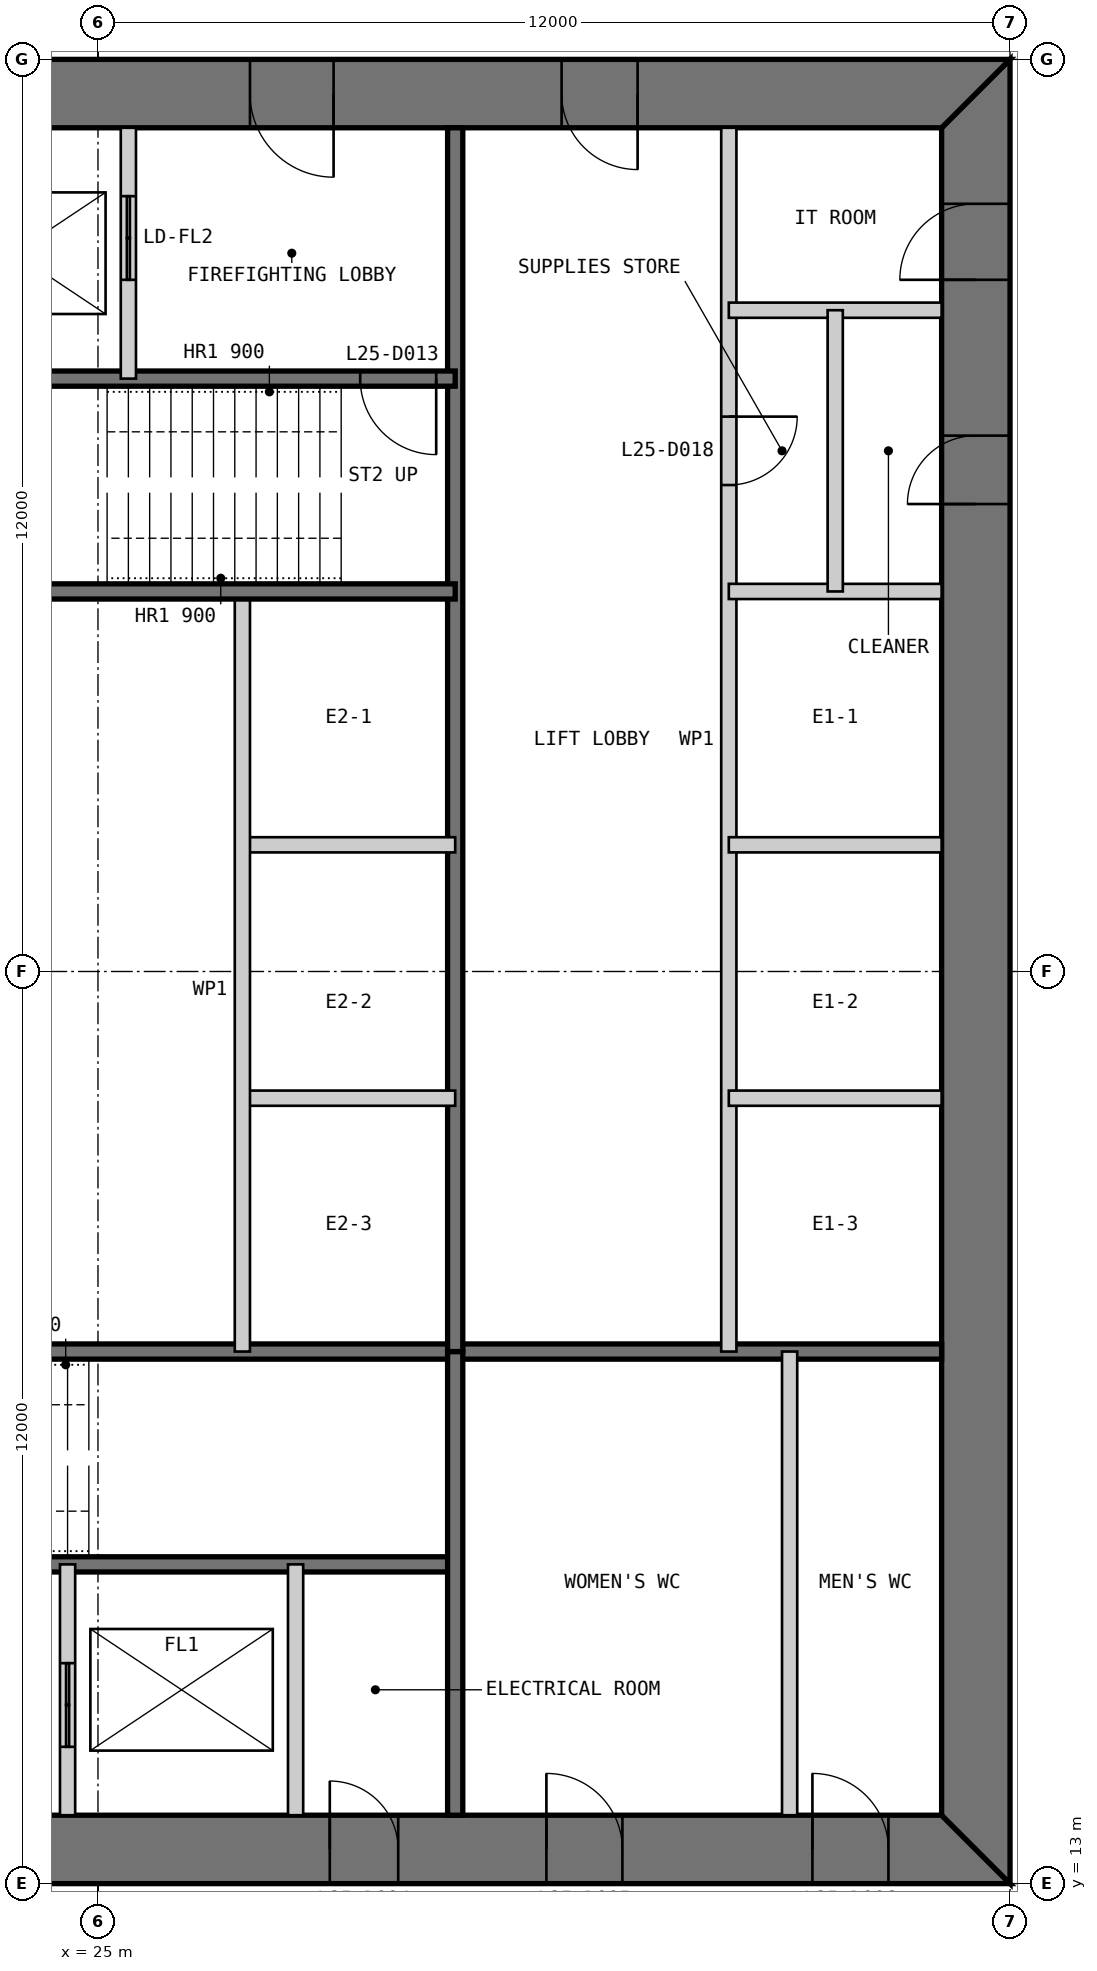
"""IFC4 building model, lengths in metres.
Left out: names, types, materials, properties, quantities, classifications, styles, units other than length and angle.
Written with IfcOpenShell. Run it as: python <this file> out.ifc"""

import sys

from ifc_helpers import new_model, si_unit, direction, frame, frame_2d, origin, place, context, subcontext, project, spatial, polyline, rectangle, outline, extrude, element, fill, save


model = new_model("IFC4")
c1 = context("Model", 3, precision=1e-05, world=origin(), true_north=direction((0.0, 1.0)))
c2 = subcontext(c1, "Body", "Model", "MODEL_VIEW")
j1 = project(units=[si_unit("LENGTHUNIT", "METRE"), si_unit("PLANEANGLEUNIT", "RADIAN")], contexts=[c1])
p1 = place(None, origin())
s1 = spatial("IfcSite", under=j1, at=p1, CompositionType="ELEMENT")
p2 = place(p1, origin())
s2 = spatial("IfcBuilding", under=s1, at=p2, CompositionType="ELEMENT")
p3 = place(p2, frame((0.0, 0.0, 110.4)))
s3 = spatial("IfcBuildingStorey", under=s2, at=p3, CompositionType="ELEMENT", Elevation=110.4)
p4 = place(p3, frame((13.0, 13.45, 0.0), z_axis=(0.0, 0.0, 1.0), x_axis=(1.0, 0.0, 0.0)))
e1 = element("IfcWall", 1, at=p4, inside=s3, PredefinedType="SHEAR", context=c2, shape_type="SweptSolid", body=[
    extrude(outline(polyline([(0.0, -0.45), (24.0, -0.45), (23.1, 0.45), (0.9, 0.45), (0.0, -0.45)])), origin(), (0.0, 0.0, 1.0), 4.0),
])
p5 = place(p4, frame((4.9, 0.0, 0.0)))
e2 = element("IfcOpeningElement", 2, at=p5, cuts=e1, PredefinedType="OPENING", context=c2, shape_type="SweptSolid", body=[
    extrude(rectangle(XDim=1.0, YDim=2.2, at=frame_2d((0.5, 1.1))), frame((0.0, 0.46, 0.0), z_axis=(0.0, -1.0, 0.0), x_axis=(1.0, 0.0, 0.0)), (0.0, 0.0, 1.0), 0.92),
])
p6 = place(p4, frame((8.9, 0.0, 0.0)))
e3 = element("IfcOpeningElement", 3, at=p6, cuts=e1, PredefinedType="OPENING", context=c2, shape_type="SweptSolid", body=[
    extrude(rectangle(XDim=1.1, YDim=2.2, at=frame_2d((0.55, 1.1))), frame((0.0, 0.46, 0.0), z_axis=(0.0, -1.0, 0.0), x_axis=(1.0, 0.0, 0.0)), (0.0, 0.0, 1.0), 0.92),
])
p7 = place(p4, frame((15.05, 0.0, 0.0)))
e4 = element("IfcOpeningElement", 4, at=p7, cuts=e1, PredefinedType="OPENING", context=c2, shape_type="SweptSolid", body=[
    extrude(rectangle(XDim=0.9, YDim=2.2, at=frame_2d((0.45, 1.1))), frame((0.0, 0.46, 0.0), z_axis=(0.0, -1.0, 0.0), x_axis=(1.0, 0.0, 0.0)), (0.0, 0.0, 1.0), 0.92),
])
p8 = place(p4, frame((17.9, 0.0, 0.0)))
e5 = element("IfcOpeningElement", 5, at=p8, cuts=e1, PredefinedType="OPENING", context=c2, shape_type="SweptSolid", body=[
    extrude(rectangle(XDim=1.0, YDim=2.2, at=frame_2d((0.5, 1.1))), frame((0.0, 0.46, 0.0), z_axis=(0.0, -1.0, 0.0), x_axis=(1.0, 0.0, 0.0)), (0.0, 0.0, 1.0), 0.92),
])
p9 = place(p4, frame((21.4, 0.0, 0.0)))
e6 = element("IfcOpeningElement", 6, at=p9, cuts=e1, PredefinedType="OPENING", context=c2, shape_type="SweptSolid", body=[
    extrude(rectangle(XDim=1.0, YDim=2.2, at=frame_2d((0.5, 1.1))), frame((0.0, 0.46, 0.0), z_axis=(0.0, -1.0, 0.0), x_axis=(1.0, 0.0, 0.0)), (0.0, 0.0, 1.0), 0.92),
])
p10 = place(p3, frame((36.55, 13.9, 0.0), z_axis=(0.0, 0.0, 1.0), x_axis=(0.0, 1.0, 0.0)))
e7 = element("IfcWall", 7, at=p10, inside=s3, PredefinedType="SHEAR", context=c2, shape_type="SweptSolid", body=[
    extrude(outline(polyline([(-0.9, -0.45), (23.1, -0.45), (22.2, 0.45), (0.0, 0.45), (-0.9, -0.45)])), origin(), (0.0, 0.0, 1.0), 4.0),
])
p11 = place(p10, frame((20.2, 0.0, 0.0)))
e8 = element("IfcOpeningElement", 8, at=p11, cuts=e7, PredefinedType="OPENING", context=c2, shape_type="SweptSolid", body=[
    extrude(rectangle(XDim=1.0, YDim=2.2, at=frame_2d((0.5, 1.1))), frame((0.0, 0.46, 0.0), z_axis=(0.0, -1.0, 0.0), x_axis=(1.0, 0.0, 0.0)), (0.0, 0.0, 1.0), 0.92),
])
p12 = place(p10, frame((17.25, 0.0, 0.0)))
e9 = element("IfcOpeningElement", 9, at=p12, cuts=e7, PredefinedType="OPENING", context=c2, shape_type="SweptSolid", body=[
    extrude(rectangle(XDim=0.9, YDim=2.2, at=frame_2d((0.45, 1.1))), frame((0.0, 0.46, 0.0), z_axis=(0.0, -1.0, 0.0), x_axis=(1.0, 0.0, 0.0)), (0.0, 0.0, 1.0), 0.92),
])
p13 = place(p3, frame((37.0, 36.55, 0.0), z_axis=(0.0, 0.0, 1.0), x_axis=(-1.0, 0.0, 0.0)))
e10 = element("IfcWall", 10, at=p13, inside=s3, PredefinedType="SHEAR", context=c2, shape_type="SweptSolid", body=[
    extrude(outline(polyline([(0.0, -0.45), (24.0, -0.45), (23.1, 0.45), (0.9, 0.45), (0.0, -0.45)])), origin(), (0.0, 0.0, 1.0), 4.0),
])
p14 = place(p13, frame((4.9, 0.0, 0.0)))
e11 = element("IfcOpeningElement", 11, at=p14, cuts=e10, PredefinedType="OPENING", context=c2, shape_type="SweptSolid", body=[
    extrude(rectangle(XDim=1.0, YDim=2.2, at=frame_2d((0.5, 1.1))), frame((0.0, 0.46, 0.0), z_axis=(0.0, -1.0, 0.0), x_axis=(1.0, 0.0, 0.0)), (0.0, 0.0, 1.0), 0.92),
])
p15 = place(p13, frame((8.9, 0.0, 0.0)))
e12 = element("IfcOpeningElement", 12, at=p15, cuts=e10, PredefinedType="OPENING", context=c2, shape_type="SweptSolid", body=[
    extrude(rectangle(XDim=1.1, YDim=2.2, at=frame_2d((0.55, 1.1))), frame((0.0, 0.46, 0.0), z_axis=(0.0, -1.0, 0.0), x_axis=(1.0, 0.0, 0.0)), (0.0, 0.0, 1.0), 0.92),
])
p16 = place(p13, frame((15.05, 0.0, 0.0)))
e13 = element("IfcOpeningElement", 13, at=p16, cuts=e10, PredefinedType="OPENING", context=c2, shape_type="SweptSolid", body=[
    extrude(rectangle(XDim=0.9, YDim=2.2, at=frame_2d((0.45, 1.1))), frame((0.0, 0.46, 0.0), z_axis=(0.0, -1.0, 0.0), x_axis=(1.0, 0.0, 0.0)), (0.0, 0.0, 1.0), 0.92),
])
p17 = place(p13, frame((17.9, 0.0, 0.0)))
e14 = element("IfcOpeningElement", 14, at=p17, cuts=e10, PredefinedType="OPENING", context=c2, shape_type="SweptSolid", body=[
    extrude(rectangle(XDim=1.0, YDim=2.2, at=frame_2d((0.5, 1.1))), frame((0.0, 0.46, 0.0), z_axis=(0.0, -1.0, 0.0), x_axis=(1.0, 0.0, 0.0)), (0.0, 0.0, 1.0), 0.92),
])
p18 = place(p13, frame((21.4, 0.0, 0.0)))
e15 = element("IfcOpeningElement", 15, at=p18, cuts=e10, PredefinedType="OPENING", context=c2, shape_type="SweptSolid", body=[
    extrude(rectangle(XDim=1.0, YDim=2.2, at=frame_2d((0.5, 1.1))), frame((0.0, 0.46, 0.0), z_axis=(0.0, -1.0, 0.0), x_axis=(1.0, 0.0, 0.0)), (0.0, 0.0, 1.0), 0.92),
])
p19 = place(p3, frame((20.3, 17.2, 0.0), z_axis=(0.0, 0.0, 1.0), x_axis=(1.0, 0.0, 0.0)))
e16 = element("IfcWall", 16, at=p19, inside=s3, PredefinedType="SOLIDWALL", context=c2, shape_type="SweptSolid", body=[
    extrude(rectangle(XDim=9.4, YDim=0.2, at=frame_2d((4.7, 0.0))), origin(), (0.0, 0.0, 1.0), 3.8),
])
p20 = place(p19, frame((0.25, 0.0, 0.0)))
e17 = element("IfcOpeningElement", 17, at=p20, cuts=e16, PredefinedType="OPENING", context=c2, shape_type="SweptSolid", body=[
    extrude(rectangle(XDim=1.0, YDim=2.2, at=frame_2d((0.5, 1.1))), frame((0.0, 0.11, 0.0), z_axis=(0.0, -1.0, 0.0), x_axis=(1.0, 0.0, 0.0)), (0.0, 0.0, 1.0), 0.22),
])
p21 = place(p3, frame((20.3, 20.0, 0.0), z_axis=(0.0, 0.0, 1.0), x_axis=(1.0, 0.0, 0.0)))
e18 = element("IfcWall", 18, at=p21, inside=s3, PredefinedType="SOLIDWALL", context=c2, shape_type="SweptSolid", body=[
    extrude(rectangle(XDim=15.8, YDim=0.2, at=frame_2d((7.9, 0.0))), origin(), (0.0, 0.0, 1.0), 3.8),
])
p22 = place(p3, frame((24.6, 13.9, 0.0), z_axis=(0.0, 0.0, 1.0), x_axis=(0.0, 1.0, 0.0)))
e19 = element("IfcWall", 19, at=p22, inside=s3, PredefinedType="PARTITIONING", context=c2, shape_type="SweptSolid", body=[
    extrude(rectangle(XDim=3.3, YDim=0.2, at=frame_2d((1.65, 0.0))), origin(), (0.0, 0.0, 1.0), 3.8),
])
p23 = place(p22, frame((0.9, 0.0, 0.0)))
e20 = element("IfcOpeningElement", 20, at=p23, cuts=e19, PredefinedType="OPENING", context=c2, shape_type="SweptSolid", body=[
    extrude(rectangle(XDim=1.1, YDim=2.2, at=frame_2d((0.55, 1.1))), frame((0.0, 0.11, 0.0), z_axis=(0.0, -1.0, 0.0), x_axis=(1.0, 0.0, 0.0)), (0.0, 0.0, 1.0), 0.22),
])
p24 = place(p3, frame((27.6, 13.9, 0.0), z_axis=(0.0, 0.0, 1.0), x_axis=(0.0, 1.0, 0.0)))
e21 = element("IfcWall", 21, at=p24, inside=s3, PredefinedType="PARTITIONING", context=c2, shape_type="SweptSolid", body=[
    extrude(rectangle(XDim=3.3, YDim=0.2, at=frame_2d((1.65, 0.0))), origin(), (0.0, 0.0, 1.0), 3.8),
])
p25 = place(p3, frame((29.7, 13.9, 0.0), z_axis=(0.0, 0.0, 1.0), x_axis=(0.0, 1.0, 0.0)))
e22 = element("IfcWall", 22, at=p25, inside=s3, PredefinedType="SOLIDWALL", context=c2, shape_type="SweptSolid", body=[
    extrude(rectangle(XDim=6.1, YDim=0.2, at=frame_2d((3.05, 0.0))), origin(), (0.0, 0.0, 1.0), 3.8),
])
p26 = place(p3, frame((34.1, 13.9, 0.0), z_axis=(0.0, 0.0, 1.0), x_axis=(0.0, 1.0, 0.0)))
e23 = element("IfcWall", 23, at=p26, inside=s3, PredefinedType="PARTITIONING", context=c2, shape_type="SweptSolid", body=[
    extrude(rectangle(XDim=6.1, YDim=0.2, at=frame_2d((3.05, 0.0))), origin(), (0.0, 0.0, 1.0), 3.8),
])
p27 = place(p3, frame((33.3, 36.1, 0.0), z_axis=(0.0, 0.0, 1.0), x_axis=(0.0, -1.0, 0.0)))
e24 = element("IfcWall", 24, at=p27, inside=s3, PredefinedType="PARTITIONING", context=c2, shape_type="SweptSolid", body=[
    extrude(rectangle(XDim=16.1, YDim=0.2, at=frame_2d((8.05, 0.0))), origin(), (0.0, 0.0, 1.0), 3.8),
])
p28 = place(p27, frame((3.8, 0.0, 0.0)))
e25 = element("IfcOpeningElement", 25, at=p28, cuts=e24, PredefinedType="OPENING", context=c2, shape_type="SweptSolid", body=[
    extrude(rectangle(XDim=0.9, YDim=2.2, at=frame_2d((0.45, 1.1))), frame((0.0, 0.11, 0.0), z_axis=(0.0, -1.0, 0.0), x_axis=(1.0, 0.0, 0.0)), (0.0, 0.0, 1.0), 0.22),
])
p29 = place(p3, frame((29.7, 36.1, 0.0), z_axis=(0.0, 0.0, 1.0), x_axis=(0.0, -1.0, 0.0)))
e26 = element("IfcWall", 26, at=p29, inside=s3, PredefinedType="SOLIDWALL", context=c2, shape_type="SweptSolid", body=[
    extrude(rectangle(XDim=16.1, YDim=0.2, at=frame_2d((8.05, 0.0))), origin(), (0.0, 0.0, 1.0), 3.8),
])
for number, where, z_axis, x_axis in (
    (27, (36.1, 30.0, 0.0), (0.0, 0.0, 1.0), (-1.0, 0.0, 0.0)),
    (28, (36.1, 26.667, 0.0), (0.0, 0.0, 1.0), (-1.0, 0.0, 0.0)),
    (29, (36.1, 23.333, 0.0), (0.0, 0.0, 1.0), (-1.0, 0.0, 0.0)),
    (30, (29.7, 26.667, 0.0), (0.0, 0.0, 1.0), (-1.0, 0.0, 0.0)),
    (31, (29.7, 23.333, 0.0), (0.0, 0.0, 1.0), (-1.0, 0.0, 0.0)),
):
    element("IfcWall", number, at=place(p3, frame(where, z_axis=z_axis, x_axis=x_axis)), inside=s3, PredefinedType="PARTITIONING", context=c2, shape_type="SweptSolid", body=[
        extrude(rectangle(XDim=2.8, YDim=0.2, at=frame_2d((1.4, 0.0))), origin(), (0.0, 0.0, 1.0), 3.8),
    ])
p30 = place(p3, frame((26.9, 30.0, 0.0), z_axis=(0.0, 0.0, 1.0), x_axis=(0.0, -1.0, 0.0)))
e32 = element("IfcWall", 32, at=p30, inside=s3, PredefinedType="PARTITIONING", context=c2, shape_type="SweptSolid", body=[
    extrude(rectangle(XDim=10.0, YDim=0.2, at=frame_2d((5.0, 0.0))), origin(), (0.0, 0.0, 1.0), 3.8),
])
p31 = place(p3, frame((29.7, 32.8, 0.0), z_axis=(0.0, 0.0, 1.0), x_axis=(-1.0, 0.0, 0.0)))
e33 = element("IfcWall", 33, at=p31, inside=s3, PredefinedType="SOLIDWALL", context=c2, shape_type="SweptSolid", body=[
    extrude(rectangle(XDim=9.4, YDim=0.2, at=frame_2d((4.7, 0.0))), origin(), (0.0, 0.0, 1.0), 3.8),
])
p32 = place(p31, frame((0.25, 0.0, 0.0)))
e34 = element("IfcOpeningElement", 34, at=p32, cuts=e33, PredefinedType="OPENING", context=c2, shape_type="SweptSolid", body=[
    extrude(rectangle(XDim=1.0, YDim=2.2, at=frame_2d((0.5, 1.1))), frame((0.0, 0.11, 0.0), z_axis=(0.0, -1.0, 0.0), x_axis=(1.0, 0.0, 0.0)), (0.0, 0.0, 1.0), 0.22),
])
p33 = place(p3, frame((29.7, 30.0, 0.0), z_axis=(0.0, 0.0, 1.0), x_axis=(-1.0, 0.0, 0.0)))
e35 = element("IfcWall", 35, at=p33, inside=s3, PredefinedType="SOLIDWALL", context=c2, shape_type="SweptSolid", body=[
    extrude(rectangle(XDim=15.8, YDim=0.2, at=frame_2d((7.9, 0.0))), origin(), (0.0, 0.0, 1.0), 3.8),
])
p34 = place(p3, frame((25.4, 36.1, 0.0), z_axis=(0.0, 0.0, 1.0), x_axis=(0.0, -1.0, 0.0)))
e36 = element("IfcWall", 36, at=p34, inside=s3, PredefinedType="PARTITIONING", context=c2, shape_type="SweptSolid", body=[
    extrude(rectangle(XDim=3.3, YDim=0.2, at=frame_2d((1.65, 0.0))), origin(), (0.0, 0.0, 1.0), 3.8),
])
p35 = place(p34, frame((0.9, 0.0, 0.0)))
e37 = element("IfcOpeningElement", 37, at=p35, cuts=e36, PredefinedType="OPENING", context=c2, shape_type="SweptSolid", body=[
    extrude(rectangle(XDim=1.1, YDim=2.2, at=frame_2d((0.55, 1.1))), frame((0.0, 0.11, 0.0), z_axis=(0.0, -1.0, 0.0), x_axis=(1.0, 0.0, 0.0)), (0.0, 0.0, 1.0), 0.22),
])
p36 = place(p3, frame((36.1, 33.7, 0.0), z_axis=(0.0, 0.0, 1.0), x_axis=(-1.0, 0.0, 0.0)))
e38 = element("IfcWall", 38, at=p36, inside=s3, PredefinedType="PARTITIONING", context=c2, shape_type="SweptSolid", body=[
    extrude(rectangle(XDim=2.8, YDim=0.2, at=frame_2d((1.4, 0.0))), origin(), (0.0, 0.0, 1.0), 3.8),
])
p37 = place(p3, frame((34.7, 33.7, 0.0), z_axis=(0.0, 0.0, 1.0), x_axis=(0.0, -1.0, 0.0)))
e39 = element("IfcWall", 39, at=p37, inside=s3, PredefinedType="PARTITIONING", context=c2, shape_type="SweptSolid", body=[
    extrude(rectangle(XDim=3.7, YDim=0.2, at=frame_2d((1.85, 0.0))), origin(), (0.0, 0.0, 1.0), 3.8),
])
p38 = place(p7, origin())
e40 = element("IfcDoor", 40, at=p38, inside=s3, OperationType="SINGLE_SWING_LEFT", PredefinedType="DOOR", context=c2, shape_type="SweptSolid", body=[
    extrude(rectangle(XDim=0.9, YDim=2.2, at=frame_2d((0.45, 1.1))), frame((0.0, 0.025, 0.0), z_axis=(0.0, -1.0, 0.0), x_axis=(1.0, 0.0, 0.0)), (0.0, 0.0, 1.0), 0.05),
    extrude(outline(polyline([(0.0, 0.0), (0.04, 0.0), (0.04, 2.16), (0.86, 2.16), (0.86, 0.0), (0.9, 0.0), (0.9, 2.2), (0.0, 2.2), (0.0, 0.0)])), frame((0.0, 0.3, 0.0), z_axis=(0.0, -1.0, 0.0), x_axis=(1.0, 0.0, 0.0)), (0.0, 0.0, 1.0), 0.6),
])
fill(e4, e40)
p39 = place(p8, origin())
e41 = element("IfcDoor", 41, at=p39, inside=s3, OperationType="SINGLE_SWING_LEFT", PredefinedType="DOOR", context=c2, shape_type="SweptSolid", body=[
    extrude(rectangle(XDim=1.0, YDim=2.2, at=frame_2d((0.5, 1.1))), frame((0.0, 0.025, 0.0), z_axis=(0.0, -1.0, 0.0), x_axis=(1.0, 0.0, 0.0)), (0.0, 0.0, 1.0), 0.05),
    extrude(outline(polyline([(0.0, 0.0), (0.04, 0.0), (0.04, 2.16), (0.96, 2.16), (0.96, 0.0), (1.0, 0.0), (1.0, 2.2), (0.0, 2.2), (0.0, 0.0)])), frame((0.0, 0.3, 0.0), z_axis=(0.0, -1.0, 0.0), x_axis=(1.0, 0.0, 0.0)), (0.0, 0.0, 1.0), 0.6),
])
fill(e5, e41)
p40 = place(p9, origin())
e42 = element("IfcDoor", 42, at=p40, inside=s3, OperationType="SINGLE_SWING_LEFT", PredefinedType="DOOR", context=c2, shape_type="SweptSolid", body=[
    extrude(rectangle(XDim=1.0, YDim=2.2, at=frame_2d((0.5, 1.1))), frame((0.0, 0.025, 0.0), z_axis=(0.0, -1.0, 0.0), x_axis=(1.0, 0.0, 0.0)), (0.0, 0.0, 1.0), 0.05),
    extrude(outline(polyline([(0.0, 0.0), (0.04, 0.0), (0.04, 2.16), (0.96, 2.16), (0.96, 0.0), (1.0, 0.0), (1.0, 2.2), (0.0, 2.2), (0.0, 0.0)])), frame((0.0, 0.3, 0.0), z_axis=(0.0, -1.0, 0.0), x_axis=(1.0, 0.0, 0.0)), (0.0, 0.0, 1.0), 0.6),
])
fill(e6, e42)
p41 = place(p14, origin())
e43 = element("IfcDoor", 43, at=p41, inside=s3, OperationType="SINGLE_SWING_LEFT", PredefinedType="DOOR", context=c2, shape_type="SweptSolid", body=[
    extrude(rectangle(XDim=1.0, YDim=2.2, at=frame_2d((0.5, 1.1))), frame((0.0, 0.025, 0.0), z_axis=(0.0, -1.0, 0.0), x_axis=(1.0, 0.0, 0.0)), (0.0, 0.0, 1.0), 0.05),
    extrude(outline(polyline([(0.0, 0.0), (0.04, 0.0), (0.04, 2.16), (0.96, 2.16), (0.96, 0.0), (1.0, 0.0), (1.0, 2.2), (0.0, 2.2), (0.0, 0.0)])), frame((0.0, 0.3, 0.0), z_axis=(0.0, -1.0, 0.0), x_axis=(1.0, 0.0, 0.0)), (0.0, 0.0, 1.0), 0.6),
])
fill(e11, e43)
p42 = place(p15, origin())
e44 = element("IfcDoor", 44, at=p42, inside=s3, OperationType="SINGLE_SWING_LEFT", PredefinedType="DOOR", context=c2, shape_type="SweptSolid", body=[
    extrude(rectangle(XDim=1.1, YDim=2.2, at=frame_2d((0.55, 1.1))), frame((0.0, 0.025, 0.0), z_axis=(0.0, -1.0, 0.0), x_axis=(1.0, 0.0, 0.0)), (0.0, 0.0, 1.0), 0.05),
    extrude(outline(polyline([(0.0, 0.0), (0.04, 0.0), (0.04, 2.16), (1.06, 2.16), (1.06, 0.0), (1.1, 0.0), (1.1, 2.2), (0.0, 2.2), (0.0, 0.0)])), frame((0.0, 0.3, 0.0), z_axis=(0.0, -1.0, 0.0), x_axis=(1.0, 0.0, 0.0)), (0.0, 0.0, 1.0), 0.6),
])
fill(e12, e44)
p43 = place(p32, origin())
e45 = element("IfcDoor", 45, at=p43, inside=s3, OperationType="SINGLE_SWING_LEFT", PredefinedType="DOOR", context=c2, shape_type="SweptSolid", body=[
    extrude(rectangle(XDim=1.0, YDim=2.2, at=frame_2d((0.5, 1.1))), frame((0.0, 0.025, 0.0), z_axis=(0.0, -1.0, 0.0), x_axis=(1.0, 0.0, 0.0)), (0.0, 0.0, 1.0), 0.05),
])
fill(e34, e45)
p44 = place(p11, origin())
e46 = element("IfcDoor", 46, at=p44, inside=s3, OperationType="SINGLE_SWING_LEFT", PredefinedType="DOOR", context=c2, shape_type="SweptSolid", body=[
    extrude(rectangle(XDim=1.0, YDim=2.2, at=frame_2d((0.5, 1.1))), frame((0.0, 0.025, 0.0), z_axis=(0.0, -1.0, 0.0), x_axis=(1.0, 0.0, 0.0)), (0.0, 0.0, 1.0), 0.05),
    extrude(outline(polyline([(0.0, 0.0), (0.04, 0.0), (0.04, 2.16), (0.96, 2.16), (0.96, 0.0), (1.0, 0.0), (1.0, 2.2), (0.0, 2.2), (0.0, 0.0)])), frame((0.0, 0.3, 0.0), z_axis=(0.0, -1.0, 0.0), x_axis=(1.0, 0.0, 0.0)), (0.0, 0.0, 1.0), 0.6),
])
fill(e8, e46)
p45 = place(p28, origin())
e47 = element("IfcDoor", 47, at=p45, inside=s3, OperationType="SINGLE_SWING_LEFT", PredefinedType="DOOR", context=c2, shape_type="SweptSolid", body=[
    extrude(rectangle(XDim=0.9, YDim=2.2, at=frame_2d((0.45, 1.1))), frame((0.0, 0.025, 0.0), z_axis=(0.0, -1.0, 0.0), x_axis=(1.0, 0.0, 0.0)), (0.0, 0.0, 1.0), 0.05),
])
fill(e25, e47)
p46 = place(p12, origin())
e48 = element("IfcDoor", 48, at=p46, inside=s3, OperationType="SINGLE_SWING_LEFT", PredefinedType="DOOR", context=c2, shape_type="SweptSolid", body=[
    extrude(rectangle(XDim=0.9, YDim=2.2, at=frame_2d((0.45, 1.1))), frame((0.0, 0.025, 0.0), z_axis=(0.0, -1.0, 0.0), x_axis=(1.0, 0.0, 0.0)), (0.0, 0.0, 1.0), 0.05),
    extrude(outline(polyline([(0.0, 0.0), (0.04, 0.0), (0.04, 2.16), (0.86, 2.16), (0.86, 0.0), (0.9, 0.0), (0.9, 2.2), (0.0, 2.2), (0.0, 0.0)])), frame((0.0, 0.3, 0.0), z_axis=(0.0, -1.0, 0.0), x_axis=(1.0, 0.0, 0.0)), (0.0, 0.0, 1.0), 0.6),
])
fill(e9, e48)
p47 = place(p23, origin())
e49 = element("IfcDoor", 49, at=p47, inside=s3, OperationType="DOUBLE_DOOR_SLIDING", PredefinedType="DOOR", context=c2, shape_type="SweptSolid", body=[
    extrude(rectangle(XDim=1.1, YDim=2.2, at=frame_2d((0.55, 1.1))), frame((0.0, 0.025, 0.0), z_axis=(0.0, -1.0, 0.0), x_axis=(1.0, 0.0, 0.0)), (0.0, 0.0, 1.0), 0.05),
])
fill(e20, e49)
p48 = place(p35, origin())
e50 = element("IfcDoor", 50, at=p48, inside=s3, OperationType="DOUBLE_DOOR_SLIDING", PredefinedType="DOOR", context=c2, shape_type="SweptSolid", body=[
    extrude(rectangle(XDim=1.1, YDim=2.2, at=frame_2d((0.55, 1.1))), frame((0.0, 0.025, 0.0), z_axis=(0.0, -1.0, 0.0), x_axis=(1.0, 0.0, 0.0)), (0.0, 0.0, 1.0), 0.05),
])
fill(e37, e50)
save(model, sys.argv[1])
